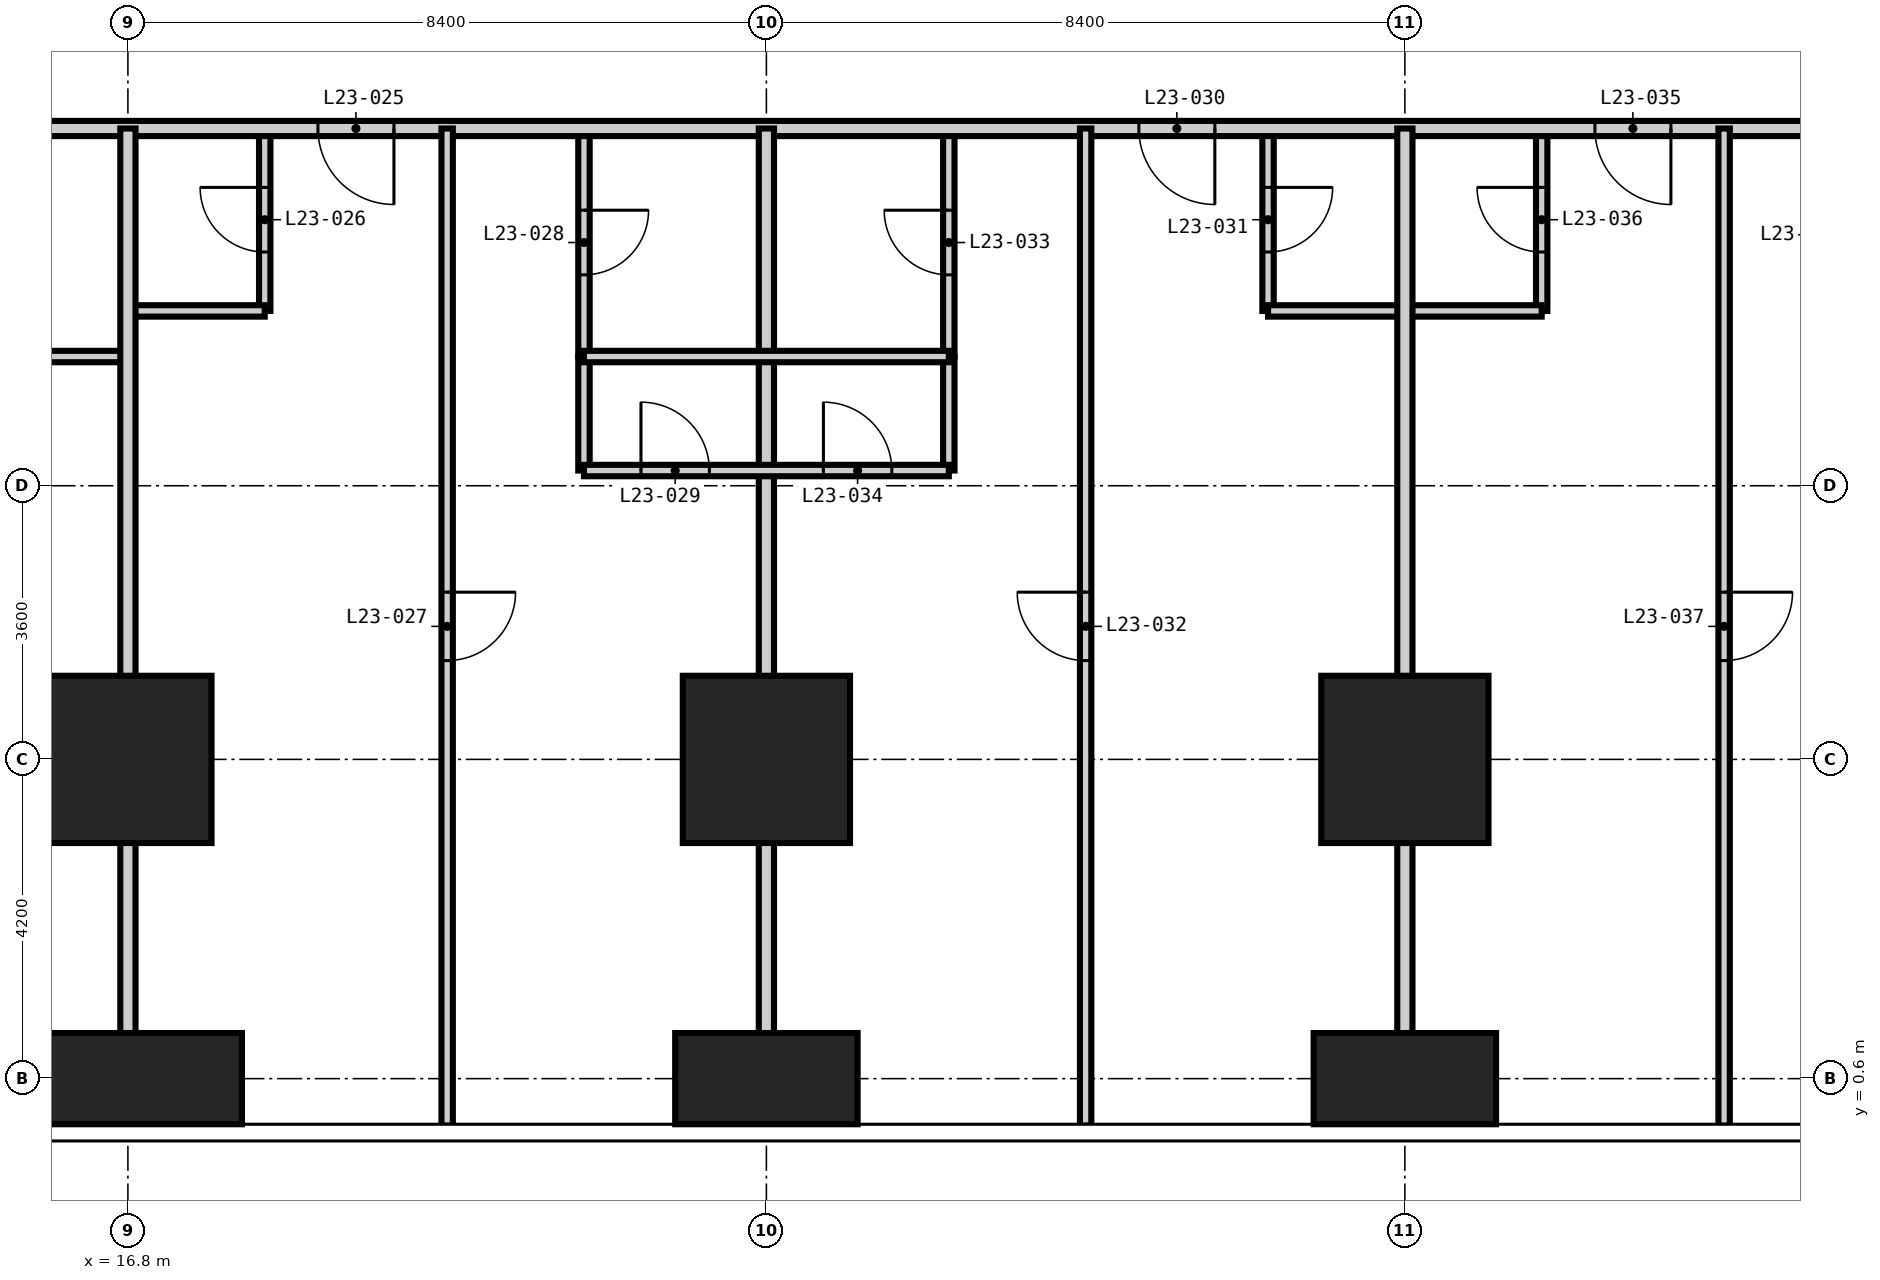
"""IFC4 building model, lengths in metres.
Left out: names, types, materials, properties, quantities, classifications, styles, units other than length and angle.
Written with IfcOpenShell. Run it as: python <this file> out.ifc"""

import sys

from ifc_helpers import new_model, si_unit, direction, frame, frame_2d, origin, origin_2d, place, context, subcontext, project, spatial, rectangle, extrude, element, fill, save


model = new_model("IFC4")
c1 = context("Model", 3, precision=1e-05, world=origin(), true_north=direction((0.0, 1.0)))
c2 = subcontext(c1, "Body", "Model", "MODEL_VIEW")
j1 = project(units=[si_unit("LENGTHUNIT", "METRE"), si_unit("PLANEANGLEUNIT", "RADIAN")], contexts=[c1])
p1 = place(None, origin())
s1 = spatial("IfcSite", under=j1, at=p1, CompositionType="ELEMENT")
p2 = place(p1, origin())
s2 = spatial("IfcBuilding", under=s1, at=p2, CompositionType="ELEMENT")
p3 = place(p2, frame((0.0, 0.0, 93.6)))
s3 = spatial("IfcBuildingStorey", under=s2, at=p3, CompositionType="ELEMENT", Elevation=93.6)
p4 = place(p3, frame((16.8, 0.6, -0.35), z_axis=(0.0, 0.0, 1.0), x_axis=(1.0, 0.0, 0.0)))
e1 = element("IfcColumn", 1, at=p4, inside=s3, PredefinedType="COLUMN", context=c2, shape_type="SweptSolid", body=[
    extrude(rectangle(XDim=3.0, YDim=1.2, at=origin_2d()), origin(), (0.0, 0.0, 1.0), 3.6),
])
p5 = place(p3, frame((16.8, 4.8, -0.35), z_axis=(0.0, 0.0, 1.0), x_axis=(1.0, 0.0, 0.0)))
e2 = element("IfcColumn", 2, at=p5, inside=s3, PredefinedType="COLUMN", context=c2, shape_type="SweptSolid", body=[
    extrude(rectangle(XDim=2.2, YDim=2.2, at=origin_2d()), origin(), (0.0, 0.0, 1.0), 3.6),
])
p6 = place(p3, frame((25.2, 0.6, -0.35), z_axis=(0.0, 0.0, 1.0), x_axis=(1.0, 0.0, 0.0)))
e3 = element("IfcColumn", 3, at=p6, inside=s3, PredefinedType="COLUMN", context=c2, shape_type="SweptSolid", body=[
    extrude(rectangle(XDim=2.4, YDim=1.2, at=origin_2d()), origin(), (0.0, 0.0, 1.0), 3.6),
])
p7 = place(p3, frame((25.2, 4.8, -0.35), z_axis=(0.0, 0.0, 1.0), x_axis=(1.0, 0.0, 0.0)))
e4 = element("IfcColumn", 4, at=p7, inside=s3, PredefinedType="COLUMN", context=c2, shape_type="SweptSolid", body=[
    extrude(rectangle(XDim=2.2, YDim=2.2, at=origin_2d()), origin(), (0.0, 0.0, 1.0), 3.6),
])
p8 = place(p3, frame((33.6, 0.6, -0.35), z_axis=(0.0, 0.0, 1.0), x_axis=(1.0, 0.0, 0.0)))
e5 = element("IfcColumn", 5, at=p8, inside=s3, PredefinedType="COLUMN", context=c2, shape_type="SweptSolid", body=[
    extrude(rectangle(XDim=2.4, YDim=1.2, at=origin_2d()), origin(), (0.0, 0.0, 1.0), 3.6),
])
p9 = place(p3, frame((33.6, 4.8, -0.35), z_axis=(0.0, 0.0, 1.0), x_axis=(1.0, 0.0, 0.0)))
e6 = element("IfcColumn", 6, at=p9, inside=s3, PredefinedType="COLUMN", context=c2, shape_type="SweptSolid", body=[
    extrude(rectangle(XDim=2.2, YDim=2.2, at=origin_2d()), origin(), (0.0, 0.0, 1.0), 3.6),
])
p10 = place(p3, frame((18.6, 10.7, 0.0), z_axis=(0.0, 0.0, 1.0), x_axis=(0.0, 1.0, 0.0)))
e7 = element("IfcWall", 7, at=p10, inside=s3, PredefinedType="PARTITIONING", context=c2, shape_type="SweptSolid", body=[
    extrude(rectangle(XDim=2.4, YDim=0.15, at=frame_2d((1.2, 0.0))), origin(), (0.0, 0.0, 1.0), 3.25),
])
p11 = place(p10, frame((0.775, 0.0, 0.0)))
e8 = element("IfcOpeningElement", 8, at=p11, cuts=e7, PredefinedType="OPENING", context=c2, shape_type="SweptSolid", body=[
    extrude(rectangle(XDim=0.85, YDim=2.1, at=frame_2d((0.425, 1.05))), frame((0.0, 0.085, 0.0), z_axis=(0.0, -1.0, 0.0), x_axis=(1.0, 0.0, 0.0)), (0.0, 0.0, 1.0), 0.17),
])
p12 = place(p3, frame((22.8, 10.1, 0.0), z_axis=(0.0, 0.0, 1.0), x_axis=(0.0, 1.0, 0.0)))
e9 = element("IfcWall", 9, at=p12, inside=s3, PredefinedType="PARTITIONING", context=c2, shape_type="SweptSolid", body=[
    extrude(rectangle(XDim=3.0, YDim=0.15, at=frame_2d((1.5, 0.0))), origin(), (0.0, 0.0, 1.0), 3.25),
])
p13 = place(p12, frame((1.075, 0.0, 0.0)))
e10 = element("IfcOpeningElement", 10, at=p13, cuts=e9, PredefinedType="OPENING", context=c2, shape_type="SweptSolid", body=[
    extrude(rectangle(XDim=0.85, YDim=2.1, at=frame_2d((0.425, 1.05))), frame((0.0, 0.085, 0.0), z_axis=(0.0, -1.0, 0.0), x_axis=(1.0, 0.0, 0.0)), (0.0, 0.0, 1.0), 0.17),
])
p14 = place(p3, frame((27.6, 10.1, 0.0), z_axis=(0.0, 0.0, 1.0), x_axis=(0.0, 1.0, 0.0)))
e11 = element("IfcWall", 11, at=p14, inside=s3, PredefinedType="PARTITIONING", context=c2, shape_type="SweptSolid", body=[
    extrude(rectangle(XDim=3.0, YDim=0.15, at=frame_2d((1.5, 0.0))), origin(), (0.0, 0.0, 1.0), 3.25),
])
p15 = place(p14, frame((1.075, 0.0, 0.0)))
e12 = element("IfcOpeningElement", 12, at=p15, cuts=e11, PredefinedType="OPENING", context=c2, shape_type="SweptSolid", body=[
    extrude(rectangle(XDim=0.85, YDim=2.1, at=frame_2d((0.425, 1.05))), frame((0.0, 0.085, 0.0), z_axis=(0.0, -1.0, 0.0), x_axis=(1.0, 0.0, 0.0)), (0.0, 0.0, 1.0), 0.17),
])
p16 = place(p3, frame((31.8, 10.7, 0.0), z_axis=(0.0, 0.0, 1.0), x_axis=(0.0, 1.0, 0.0)))
e13 = element("IfcWall", 13, at=p16, inside=s3, PredefinedType="PARTITIONING", context=c2, shape_type="SweptSolid", body=[
    extrude(rectangle(XDim=2.4, YDim=0.15, at=frame_2d((1.2, 0.0))), origin(), (0.0, 0.0, 1.0), 3.25),
])
p17 = place(p16, frame((0.775, 0.0, 0.0)))
e14 = element("IfcOpeningElement", 14, at=p17, cuts=e13, PredefinedType="OPENING", context=c2, shape_type="SweptSolid", body=[
    extrude(rectangle(XDim=0.85, YDim=2.1, at=frame_2d((0.425, 1.05))), frame((0.0, 0.085, 0.0), z_axis=(0.0, -1.0, 0.0), x_axis=(1.0, 0.0, 0.0)), (0.0, 0.0, 1.0), 0.17),
])
p18 = place(p3, frame((35.4, 10.7, 0.0), z_axis=(0.0, 0.0, 1.0), x_axis=(0.0, 1.0, 0.0)))
e15 = element("IfcWall", 15, at=p18, inside=s3, PredefinedType="PARTITIONING", context=c2, shape_type="SweptSolid", body=[
    extrude(rectangle(XDim=2.4, YDim=0.15, at=frame_2d((1.2, 0.0))), origin(), (0.0, 0.0, 1.0), 3.25),
])
p19 = place(p18, frame((0.775, 0.0, 0.0)))
e16 = element("IfcOpeningElement", 16, at=p19, cuts=e15, PredefinedType="OPENING", context=c2, shape_type="SweptSolid", body=[
    extrude(rectangle(XDim=0.85, YDim=2.1, at=frame_2d((0.425, 1.05))), frame((0.0, 0.085, 0.0), z_axis=(0.0, -1.0, 0.0), x_axis=(1.0, 0.0, 0.0)), (0.0, 0.0, 1.0), 0.17),
])
p20 = place(p3, frame((12.6, 10.1, 0.0), z_axis=(0.0, 0.0, 1.0), x_axis=(1.0, 0.0, 0.0)))
e17 = element("IfcWall", 17, at=p20, inside=s3, PredefinedType="PARTITIONING", context=c2, shape_type="SweptSolid", body=[
    extrude(rectangle(XDim=4.2, YDim=0.15, at=frame_2d((2.1, 0.0))), origin(), (0.0, 0.0, 1.0), 3.25),
])
p21 = place(p20, frame((1.675, 0.0, 0.0)))
e18 = element("IfcOpeningElement", 18, at=p21, cuts=e17, PredefinedType="OPENING", context=c2, shape_type="SweptSolid", body=[
    extrude(rectangle(XDim=0.85, YDim=2.1, at=frame_2d((0.425, 1.05))), frame((0.0, 0.085, 0.0), z_axis=(0.0, -1.0, 0.0), x_axis=(1.0, 0.0, 0.0)), (0.0, 0.0, 1.0), 0.17),
])
p22 = place(p3, frame((16.8, 10.7, 0.0), z_axis=(0.0, 0.0, 1.0), x_axis=(1.0, 0.0, 0.0)))
e19 = element("IfcWall", 19, at=p22, inside=s3, PredefinedType="PARTITIONING", context=c2, shape_type="SweptSolid", body=[
    extrude(rectangle(XDim=1.8, YDim=0.15, at=frame_2d((0.9, 0.0))), origin(), (0.0, 0.0, 1.0), 3.25),
])
p23 = place(p3, frame((31.8, 10.7, 0.0), z_axis=(0.0, 0.0, 1.0), x_axis=(1.0, 0.0, 0.0)))
e20 = element("IfcWall", 20, at=p23, inside=s3, PredefinedType="PARTITIONING", context=c2, shape_type="SweptSolid", body=[
    extrude(rectangle(XDim=3.6, YDim=0.15, at=frame_2d((1.8, 0.0))), origin(), (0.0, 0.0, 1.0), 3.25),
])
p24 = place(p3, frame((45.1, 13.1, 0.0), z_axis=(0.0, 0.0, 1.0), x_axis=(-1.0, 0.0, 0.0)))
e21 = element("IfcWall", 21, at=p24, inside=s3, PredefinedType="PARTITIONING", context=c2, shape_type="SweptSolid", body=[
    extrude(rectangle(XDim=32.5, YDim=0.2, at=frame_2d((16.25, 0.0))), origin(), (0.0, 0.0, 1.0), 3.25),
])
p25 = place(p24, frame((24.8, 0.0, 0.0)))
e22 = element("IfcOpeningElement", 22, at=p25, cuts=e21, PredefinedType="OPENING", context=c2, shape_type="SweptSolid", body=[
    extrude(rectangle(XDim=1.0, YDim=2.2, at=frame_2d((0.5, 1.1))), frame((0.0, 0.11, 0.0), z_axis=(0.0, -1.0, 0.0), x_axis=(1.0, 0.0, 0.0)), (0.0, 0.0, 1.0), 0.22),
])
p26 = place(p24, frame((14.0, 0.0, 0.0)))
e23 = element("IfcOpeningElement", 23, at=p26, cuts=e21, PredefinedType="OPENING", context=c2, shape_type="SweptSolid", body=[
    extrude(rectangle(XDim=1.0, YDim=2.2, at=frame_2d((0.5, 1.1))), frame((0.0, 0.11, 0.0), z_axis=(0.0, -1.0, 0.0), x_axis=(1.0, 0.0, 0.0)), (0.0, 0.0, 1.0), 0.22),
])
p27 = place(p24, frame((8.0, 0.0, 0.0)))
e24 = element("IfcOpeningElement", 24, at=p27, cuts=e21, PredefinedType="OPENING", context=c2, shape_type="SweptSolid", body=[
    extrude(rectangle(XDim=1.0, YDim=2.2, at=frame_2d((0.5, 1.1))), frame((0.0, 0.11, 0.0), z_axis=(0.0, -1.0, 0.0), x_axis=(1.0, 0.0, 0.0)), (0.0, 0.0, 1.0), 0.22),
])
for number, where, z_axis, x_axis in (
    (25, (16.8, -0.018, 0.0), (0.0, 0.0, 1.0), (0.0, 1.0, 0.0)),
    (26, (25.2, -0.018, 0.0), (0.0, 0.0, 1.0), (0.0, 1.0, 0.0)),
    (27, (33.6, -0.018, 0.0), (0.0, 0.0, 1.0), (0.0, 1.0, 0.0)),
):
    element("IfcWall", number, at=place(p3, frame(where, z_axis=z_axis, x_axis=x_axis)), inside=s3, PredefinedType="PARTITIONING", context=c2, shape_type="SweptSolid", body=[
        extrude(rectangle(XDim=13.118, YDim=0.2, at=frame_2d((6.559, 0.0))), origin(), (0.0, 0.0, 1.0), 3.25),
    ])
p28 = place(p3, frame((21.0, -0.018, 0.0), z_axis=(0.0, 0.0, 1.0), x_axis=(0.0, 1.0, 0.0)))
e28 = element("IfcWall", 28, at=p28, inside=s3, PredefinedType="PARTITIONING", context=c2, shape_type="SweptSolid", body=[
    extrude(rectangle(XDim=13.118, YDim=0.15, at=frame_2d((6.559, 0.0))), origin(), (0.0, 0.0, 1.0), 3.25),
])
p29 = place(p28, frame((6.118, 0.0, 0.0)))
e29 = element("IfcOpeningElement", 29, at=p29, cuts=e28, PredefinedType="OPENING", context=c2, shape_type="SweptSolid", body=[
    extrude(rectangle(XDim=0.9, YDim=2.1, at=frame_2d((0.45, 1.05))), frame((0.0, 0.085, 0.0), z_axis=(0.0, -1.0, 0.0), x_axis=(1.0, 0.0, 0.0)), (0.0, 0.0, 1.0), 0.17),
])
for number, where, z_axis, x_axis in (
    (30, (22.8, 8.6, 0.0), (0.0, 0.0, 1.0), (0.0, 1.0, 0.0)),
    (31, (27.6, 8.6, 0.0), (0.0, 0.0, 1.0), (0.0, 1.0, 0.0)),
):
    element("IfcWall", number, at=place(p3, frame(where, z_axis=z_axis, x_axis=x_axis)), inside=s3, PredefinedType="PARTITIONING", context=c2, shape_type="SweptSolid", body=[
        extrude(rectangle(XDim=1.5, YDim=0.15, at=frame_2d((0.75, 0.0))), origin(), (0.0, 0.0, 1.0), 3.25),
    ])
p30 = place(p3, frame((29.4, -0.018, 0.0), z_axis=(0.0, 0.0, 1.0), x_axis=(0.0, 1.0, 0.0)))
e32 = element("IfcWall", 32, at=p30, inside=s3, PredefinedType="PARTITIONING", context=c2, shape_type="SweptSolid", body=[
    extrude(rectangle(XDim=13.118, YDim=0.15, at=frame_2d((6.559, 0.0))), origin(), (0.0, 0.0, 1.0), 3.25),
])
p31 = place(p30, frame((6.118, 0.0, 0.0)))
e33 = element("IfcOpeningElement", 33, at=p31, cuts=e32, PredefinedType="OPENING", context=c2, shape_type="SweptSolid", body=[
    extrude(rectangle(XDim=0.9, YDim=2.1, at=frame_2d((0.45, 1.05))), frame((0.0, 0.085, 0.0), z_axis=(0.0, -1.0, 0.0), x_axis=(1.0, 0.0, 0.0)), (0.0, 0.0, 1.0), 0.17),
])
p32 = place(p3, frame((37.8, -0.018, 0.0), z_axis=(0.0, 0.0, 1.0), x_axis=(0.0, 1.0, 0.0)))
e34 = element("IfcWall", 34, at=p32, inside=s3, PredefinedType="PARTITIONING", context=c2, shape_type="SweptSolid", body=[
    extrude(rectangle(XDim=13.118, YDim=0.15, at=frame_2d((6.559, 0.0))), origin(), (0.0, 0.0, 1.0), 3.25),
])
p33 = place(p32, frame((6.118, 0.0, 0.0)))
e35 = element("IfcOpeningElement", 35, at=p33, cuts=e34, PredefinedType="OPENING", context=c2, shape_type="SweptSolid", body=[
    extrude(rectangle(XDim=0.9, YDim=2.1, at=frame_2d((0.45, 1.05))), frame((0.0, 0.085, 0.0), z_axis=(0.0, -1.0, 0.0), x_axis=(1.0, 0.0, 0.0)), (0.0, 0.0, 1.0), 0.17),
])
p34 = place(p3, frame((22.8, 8.6, 0.0), z_axis=(0.0, 0.0, 1.0), x_axis=(1.0, 0.0, 0.0)))
e36 = element("IfcWall", 36, at=p34, inside=s3, PredefinedType="PARTITIONING", context=c2, shape_type="SweptSolid", body=[
    extrude(rectangle(XDim=4.8, YDim=0.15, at=frame_2d((2.4, 0.0))), origin(), (0.0, 0.0, 1.0), 3.25),
])
p35 = place(p34, frame((0.75, 0.0, 0.0)))
e37 = element("IfcOpeningElement", 37, at=p35, cuts=e36, PredefinedType="OPENING", context=c2, shape_type="SweptSolid", body=[
    extrude(rectangle(XDim=0.9, YDim=2.1, at=frame_2d((0.45, 1.05))), frame((0.0, 0.085, 0.0), z_axis=(0.0, -1.0, 0.0), x_axis=(1.0, 0.0, 0.0)), (0.0, 0.0, 1.0), 0.17),
])
p36 = place(p34, frame((3.15, 0.0, 0.0)))
e38 = element("IfcOpeningElement", 38, at=p36, cuts=e36, PredefinedType="OPENING", context=c2, shape_type="SweptSolid", body=[
    extrude(rectangle(XDim=0.9, YDim=2.1, at=frame_2d((0.45, 1.05))), frame((0.0, 0.085, 0.0), z_axis=(0.0, -1.0, 0.0), x_axis=(1.0, 0.0, 0.0)), (0.0, 0.0, 1.0), 0.17),
])
p37 = place(p3, frame((22.8, 10.1, 0.0), z_axis=(0.0, 0.0, 1.0), x_axis=(1.0, 0.0, 0.0)))
e39 = element("IfcWall", 39, at=p37, inside=s3, PredefinedType="PARTITIONING", context=c2, shape_type="SweptSolid", body=[
    extrude(rectangle(XDim=4.8, YDim=0.15, at=frame_2d((2.4, 0.0))), origin(), (0.0, 0.0, 1.0), 3.25),
])
p38 = place(p25, origin())
e40 = element("IfcDoor", 40, at=p38, inside=s3, OperationType="SINGLE_SWING_LEFT", PredefinedType="DOOR", context=c2, shape_type="SweptSolid", body=[
    extrude(rectangle(XDim=1.0, YDim=2.2, at=frame_2d((0.5, 1.1))), frame((0.0, 0.025, 0.0), z_axis=(0.0, -1.0, 0.0), x_axis=(1.0, 0.0, 0.0)), (0.0, 0.0, 1.0), 0.05),
])
fill(e22, e40)
p39 = place(p11, origin())
e41 = element("IfcDoor", 41, at=p39, inside=s3, OperationType="SINGLE_SWING_RIGHT", PredefinedType="DOOR", context=c2, shape_type="SweptSolid", body=[
    extrude(rectangle(XDim=0.85, YDim=2.1, at=frame_2d((0.425, 1.05))), frame((0.0, 0.025, 0.0), z_axis=(0.0, -1.0, 0.0), x_axis=(1.0, 0.0, 0.0)), (0.0, 0.0, 1.0), 0.05),
])
fill(e8, e41)
p40 = place(p29, frame((0.9, 0.0, 0.0), z_axis=(0.0, 0.0, 1.0), x_axis=(-1.0, 0.0, 0.0)))
e42 = element("IfcDoor", 42, at=p40, inside=s3, OperationType="SINGLE_SWING_LEFT", PredefinedType="DOOR", context=c2, shape_type="SweptSolid", body=[
    extrude(rectangle(XDim=0.9, YDim=2.1, at=frame_2d((0.45, 1.05))), frame((0.0, 0.025, 0.0), z_axis=(0.0, -1.0, 0.0), x_axis=(1.0, 0.0, 0.0)), (0.0, 0.0, 1.0), 0.05),
])
fill(e29, e42)
p41 = place(p13, frame((0.85, 0.0, 0.0), z_axis=(0.0, 0.0, 1.0), x_axis=(-1.0, 0.0, 0.0)))
e43 = element("IfcDoor", 43, at=p41, inside=s3, OperationType="SINGLE_SWING_LEFT", PredefinedType="DOOR", context=c2, shape_type="SweptSolid", body=[
    extrude(rectangle(XDim=0.85, YDim=2.1, at=frame_2d((0.425, 1.05))), frame((0.0, 0.025, 0.0), z_axis=(0.0, -1.0, 0.0), x_axis=(1.0, 0.0, 0.0)), (0.0, 0.0, 1.0), 0.05),
])
fill(e10, e43)
p42 = place(p35, origin())
e44 = element("IfcDoor", 44, at=p42, inside=s3, OperationType="SINGLE_SWING_LEFT", PredefinedType="DOOR", context=c2, shape_type="SweptSolid", body=[
    extrude(rectangle(XDim=0.9, YDim=2.1, at=frame_2d((0.45, 1.05))), frame((0.0, 0.025, 0.0), z_axis=(0.0, -1.0, 0.0), x_axis=(1.0, 0.0, 0.0)), (0.0, 0.0, 1.0), 0.05),
])
fill(e37, e44)
p43 = place(p26, origin())
e45 = element("IfcDoor", 45, at=p43, inside=s3, OperationType="SINGLE_SWING_LEFT", PredefinedType="DOOR", context=c2, shape_type="SweptSolid", body=[
    extrude(rectangle(XDim=1.0, YDim=2.2, at=frame_2d((0.5, 1.1))), frame((0.0, 0.025, 0.0), z_axis=(0.0, -1.0, 0.0), x_axis=(1.0, 0.0, 0.0)), (0.0, 0.0, 1.0), 0.05),
])
fill(e23, e45)
p44 = place(p17, frame((0.85, 0.0, 0.0), z_axis=(0.0, 0.0, 1.0), x_axis=(-1.0, 0.0, 0.0)))
e46 = element("IfcDoor", 46, at=p44, inside=s3, OperationType="SINGLE_SWING_LEFT", PredefinedType="DOOR", context=c2, shape_type="SweptSolid", body=[
    extrude(rectangle(XDim=0.85, YDim=2.1, at=frame_2d((0.425, 1.05))), frame((0.0, 0.025, 0.0), z_axis=(0.0, -1.0, 0.0), x_axis=(1.0, 0.0, 0.0)), (0.0, 0.0, 1.0), 0.05),
])
fill(e14, e46)
p45 = place(p31, origin())
e47 = element("IfcDoor", 47, at=p45, inside=s3, OperationType="SINGLE_SWING_RIGHT", PredefinedType="DOOR", context=c2, shape_type="SweptSolid", body=[
    extrude(rectangle(XDim=0.9, YDim=2.1, at=frame_2d((0.45, 1.05))), frame((0.0, 0.025, 0.0), z_axis=(0.0, -1.0, 0.0), x_axis=(1.0, 0.0, 0.0)), (0.0, 0.0, 1.0), 0.05),
])
fill(e33, e47)
p46 = place(p15, origin())
e48 = element("IfcDoor", 48, at=p46, inside=s3, OperationType="SINGLE_SWING_RIGHT", PredefinedType="DOOR", context=c2, shape_type="SweptSolid", body=[
    extrude(rectangle(XDim=0.85, YDim=2.1, at=frame_2d((0.425, 1.05))), frame((0.0, 0.025, 0.0), z_axis=(0.0, -1.0, 0.0), x_axis=(1.0, 0.0, 0.0)), (0.0, 0.0, 1.0), 0.05),
])
fill(e12, e48)
p47 = place(p36, origin())
e49 = element("IfcDoor", 49, at=p47, inside=s3, OperationType="SINGLE_SWING_LEFT", PredefinedType="DOOR", context=c2, shape_type="SweptSolid", body=[
    extrude(rectangle(XDim=0.9, YDim=2.1, at=frame_2d((0.45, 1.05))), frame((0.0, 0.025, 0.0), z_axis=(0.0, -1.0, 0.0), x_axis=(1.0, 0.0, 0.0)), (0.0, 0.0, 1.0), 0.05),
])
fill(e38, e49)
p48 = place(p27, origin())
e50 = element("IfcDoor", 50, at=p48, inside=s3, OperationType="SINGLE_SWING_LEFT", PredefinedType="DOOR", context=c2, shape_type="SweptSolid", body=[
    extrude(rectangle(XDim=1.0, YDim=2.2, at=frame_2d((0.5, 1.1))), frame((0.0, 0.025, 0.0), z_axis=(0.0, -1.0, 0.0), x_axis=(1.0, 0.0, 0.0)), (0.0, 0.0, 1.0), 0.05),
])
fill(e24, e50)
p49 = place(p19, origin())
e51 = element("IfcDoor", 51, at=p49, inside=s3, OperationType="SINGLE_SWING_RIGHT", PredefinedType="DOOR", context=c2, shape_type="SweptSolid", body=[
    extrude(rectangle(XDim=0.85, YDim=2.1, at=frame_2d((0.425, 1.05))), frame((0.0, 0.025, 0.0), z_axis=(0.0, -1.0, 0.0), x_axis=(1.0, 0.0, 0.0)), (0.0, 0.0, 1.0), 0.05),
])
fill(e16, e51)
p50 = place(p33, frame((0.9, 0.0, 0.0), z_axis=(0.0, 0.0, 1.0), x_axis=(-1.0, 0.0, 0.0)))
e52 = element("IfcDoor", 52, at=p50, inside=s3, OperationType="SINGLE_SWING_LEFT", PredefinedType="DOOR", context=c2, shape_type="SweptSolid", body=[
    extrude(rectangle(XDim=0.9, YDim=2.1, at=frame_2d((0.45, 1.05))), frame((0.0, 0.025, 0.0), z_axis=(0.0, -1.0, 0.0), x_axis=(1.0, 0.0, 0.0)), (0.0, 0.0, 1.0), 0.05),
])
fill(e35, e52)
save(model, sys.argv[1])
